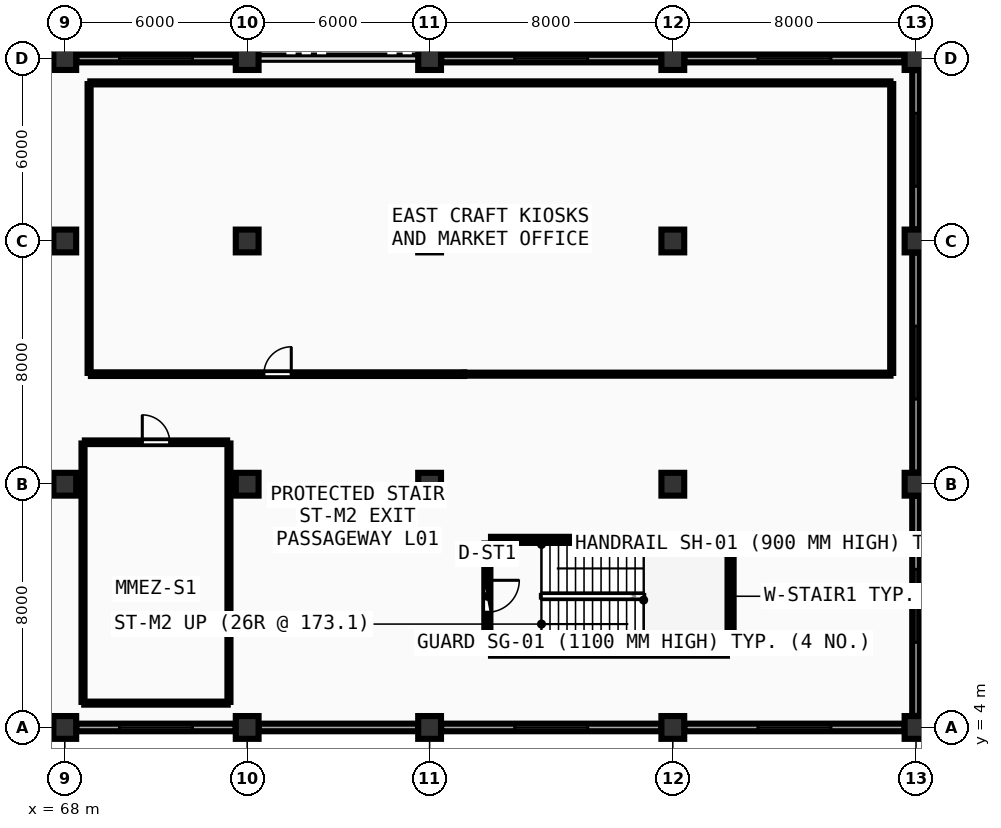
"""IFC4 building model, lengths in metres.
Left out: names, types, materials, properties, quantities, classifications, styles, units other than length and angle.
Written with IfcOpenShell. Run it as: python <this file> out.ifc"""

import sys

from ifc_helpers import new_model, si_unit, direction, frame, frame_2d, origin, origin_2d, place, context, subcontext, project, spatial, rectangle, extrude, element, fill, save


model = new_model("IFC4")
c1 = context("Model", 3, precision=1e-05, world=origin(), true_north=direction((0.0, 1.0)))
c2 = subcontext(c1, "Body", "Model", "MODEL_VIEW")
j1 = project(units=[si_unit("LENGTHUNIT", "METRE"), si_unit("PLANEANGLEUNIT", "RADIAN")], contexts=[c1])
p1 = place(None, origin())
s1 = spatial("IfcSite", under=j1, at=p1, CompositionType="ELEMENT")
p2 = place(p1, origin())
s2 = spatial("IfcBuilding", under=s1, at=p2, CompositionType="ELEMENT")
p3 = place(p2, frame((0.0, 0.0, 4.5)))
s3 = spatial("IfcBuildingStorey", under=s2, at=p3, CompositionType="ELEMENT", Elevation=4.5)
for number, where, z_axis, x_axis in (
    (1, (68.0, 4.0, 0.0), (0.0, 0.0, 1.0), (1.0, 0.0, 0.0)),
    (2, (68.0, 12.0, 0.0), (0.0, 0.0, 1.0), (1.0, 0.0, 0.0)),
    (3, (68.0, 20.0, 0.0), (0.0, 0.0, 1.0), (1.0, 0.0, 0.0)),
    (4, (68.0, 26.0, 0.0), (0.0, 0.0, 1.0), (1.0, 0.0, 0.0)),
    (5, (74.0, 4.0, 0.0), (0.0, 0.0, 1.0), (1.0, 0.0, 0.0)),
    (6, (74.0, 12.0, 0.0), (0.0, 0.0, 1.0), (1.0, 0.0, 0.0)),
    (7, (74.0, 20.0, 0.0), (0.0, 0.0, 1.0), (1.0, 0.0, 0.0)),
    (8, (74.0, 26.0, 0.0), (0.0, 0.0, 1.0), (1.0, 0.0, 0.0)),
    (9, (80.0, 4.0, 0.0), (0.0, 0.0, 1.0), (1.0, 0.0, 0.0)),
    (10, (80.0, 12.0, 0.0), (0.0, 0.0, 1.0), (1.0, 0.0, 0.0)),
    (11, (80.0, 20.0, 0.0), (0.0, 0.0, 1.0), (1.0, 0.0, 0.0)),
    (12, (80.0, 26.0, 0.0), (0.0, 0.0, 1.0), (1.0, 0.0, 0.0)),
    (13, (88.0, 4.0, 0.0), (0.0, 0.0, 1.0), (1.0, 0.0, 0.0)),
    (14, (88.0, 12.0, 0.0), (0.0, 0.0, 1.0), (1.0, 0.0, 0.0)),
    (15, (88.0, 20.0, 0.0), (0.0, 0.0, 1.0), (1.0, 0.0, 0.0)),
    (16, (88.0, 26.0, 0.0), (0.0, 0.0, 1.0), (1.0, 0.0, 0.0)),
    (17, (96.0, 4.0, 0.0), (0.0, 0.0, 1.0), (1.0, 0.0, 0.0)),
    (18, (96.0, 12.0, 0.0), (0.0, 0.0, 1.0), (1.0, 0.0, 0.0)),
    (19, (96.0, 20.0, 0.0), (0.0, 0.0, 1.0), (1.0, 0.0, 0.0)),
    (20, (96.0, 26.0, 0.0), (0.0, 0.0, 1.0), (1.0, 0.0, 0.0)),
):
    element("IfcColumn", number, at=place(p3, frame(where, z_axis=z_axis, x_axis=x_axis)), inside=s3, PredefinedType="COLUMN", context=c2, shape_type="SweptSolid", body=[
        extrude(rectangle(XDim=0.75, YDim=0.75, at=origin_2d()), origin(), (0.0, 0.0, 1.0), 4.5),
    ])
p4 = place(p3, frame((68.38, 4.0, 0.0), z_axis=(0.0, 0.0, 1.0), x_axis=(1.0, 0.0, 0.0)))
e21 = element("IfcWall", 21, at=p4, inside=s3, PredefinedType="SOLIDWALL", context=c2, shape_type="SweptSolid", body=[
    extrude(rectangle(XDim=5.24, YDim=0.25, at=frame_2d((2.62, 0.0))), origin(), (0.0, 0.0, 1.0), 3.42),
])
p5 = place(p4, frame((1.42, 0.0, 0.95)))
e22 = element("IfcOpeningElement", 22, at=p5, cuts=e21, PredefinedType="OPENING", context=c2, shape_type="SweptSolid", body=[
    extrude(rectangle(XDim=2.4, YDim=1.65, at=frame_2d((1.2, 0.825))), frame((0.0, 0.135, 0.0), z_axis=(0.0, -1.0, 0.0), x_axis=(1.0, 0.0, 0.0)), (0.0, 0.0, 1.0), 0.27),
])
p6 = place(p3, frame((74.38, 4.0, 0.0), z_axis=(0.0, 0.0, 1.0), x_axis=(1.0, 0.0, 0.0)))
e23 = element("IfcWall", 23, at=p6, inside=s3, PredefinedType="SOLIDWALL", context=c2, shape_type="SweptSolid", body=[
    extrude(rectangle(XDim=5.24, YDim=0.25, at=frame_2d((2.62, 0.0))), origin(), (0.0, 0.0, 1.0), 3.42),
])
p7 = place(p3, frame((80.38, 4.0, 0.0), z_axis=(0.0, 0.0, 1.0), x_axis=(1.0, 0.0, 0.0)))
e24 = element("IfcWall", 24, at=p7, inside=s3, PredefinedType="SOLIDWALL", context=c2, shape_type="SweptSolid", body=[
    extrude(rectangle(XDim=7.24, YDim=0.25, at=frame_2d((3.62, 0.0))), origin(), (0.0, 0.0, 1.0), 3.42),
])
p8 = place(p7, frame((2.42, 0.0, 0.95)))
e25 = element("IfcOpeningElement", 25, at=p8, cuts=e24, PredefinedType="OPENING", context=c2, shape_type="SweptSolid", body=[
    extrude(rectangle(XDim=2.4, YDim=1.65, at=frame_2d((1.2, 0.825))), frame((0.0, 0.135, 0.0), z_axis=(0.0, -1.0, 0.0), x_axis=(1.0, 0.0, 0.0)), (0.0, 0.0, 1.0), 0.27),
])
p9 = place(p3, frame((88.38, 4.0, 0.0), z_axis=(0.0, 0.0, 1.0), x_axis=(1.0, 0.0, 0.0)))
e26 = element("IfcWall", 26, at=p9, inside=s3, PredefinedType="SOLIDWALL", context=c2, shape_type="SweptSolid", body=[
    extrude(rectangle(XDim=7.24, YDim=0.25, at=frame_2d((3.62, 0.0))), origin(), (0.0, 0.0, 1.0), 3.42),
])
p10 = place(p9, frame((2.42, 0.0, 0.95)))
e27 = element("IfcOpeningElement", 27, at=p10, cuts=e26, PredefinedType="OPENING", context=c2, shape_type="SweptSolid", body=[
    extrude(rectangle(XDim=2.4, YDim=1.65, at=frame_2d((1.2, 0.825))), frame((0.0, 0.135, 0.0), z_axis=(0.0, -1.0, 0.0), x_axis=(1.0, 0.0, 0.0)), (0.0, 0.0, 1.0), 0.27),
])
p11 = place(p3, frame((96.0, 4.38, 0.0), z_axis=(0.0, 0.0, 1.0), x_axis=(0.0, 1.0, 0.0)))
e28 = element("IfcWall", 28, at=p11, inside=s3, PredefinedType="SOLIDWALL", context=c2, shape_type="SweptSolid", body=[
    extrude(rectangle(XDim=7.24, YDim=0.25, at=frame_2d((3.62, 0.0))), origin(), (0.0, 0.0, 1.0), 3.42),
])
p12 = place(p11, frame((2.42, 0.0, 0.95)))
e29 = element("IfcOpeningElement", 29, at=p12, cuts=e28, PredefinedType="OPENING", context=c2, shape_type="SweptSolid", body=[
    extrude(rectangle(XDim=2.4, YDim=1.65, at=frame_2d((1.2, 0.825))), frame((0.0, 0.135, 0.0), z_axis=(0.0, -1.0, 0.0), x_axis=(1.0, 0.0, 0.0)), (0.0, 0.0, 1.0), 0.27),
])
p13 = place(p3, frame((96.0, 12.38, 0.0), z_axis=(0.0, 0.0, 1.0), x_axis=(0.0, 1.0, 0.0)))
e30 = element("IfcWall", 30, at=p13, inside=s3, PredefinedType="SOLIDWALL", context=c2, shape_type="SweptSolid", body=[
    extrude(rectangle(XDim=7.24, YDim=0.25, at=frame_2d((3.62, 0.0))), origin(), (0.0, 0.0, 1.0), 3.42),
])
p14 = place(p13, frame((2.42, 0.0, 0.95)))
e31 = element("IfcOpeningElement", 31, at=p14, cuts=e30, PredefinedType="OPENING", context=c2, shape_type="SweptSolid", body=[
    extrude(rectangle(XDim=2.4, YDim=1.65, at=frame_2d((1.2, 0.825))), frame((0.0, 0.135, 0.0), z_axis=(0.0, -1.0, 0.0), x_axis=(1.0, 0.0, 0.0)), (0.0, 0.0, 1.0), 0.27),
])
p15 = place(p3, frame((96.0, 20.38, 0.0), z_axis=(0.0, 0.0, 1.0), x_axis=(0.0, 1.0, 0.0)))
e32 = element("IfcWall", 32, at=p15, inside=s3, PredefinedType="SOLIDWALL", context=c2, shape_type="SweptSolid", body=[
    extrude(rectangle(XDim=5.24, YDim=0.25, at=frame_2d((2.62, 0.0))), origin(), (0.0, 0.0, 1.0), 3.42),
])
p16 = place(p15, frame((1.42, 0.0, 0.95)))
e33 = element("IfcOpeningElement", 33, at=p16, cuts=e32, PredefinedType="OPENING", context=c2, shape_type="SweptSolid", body=[
    extrude(rectangle(XDim=2.4, YDim=1.65, at=frame_2d((1.2, 0.825))), frame((0.0, 0.135, 0.0), z_axis=(0.0, -1.0, 0.0), x_axis=(1.0, 0.0, 0.0)), (0.0, 0.0, 1.0), 0.27),
])
p17 = place(p3, frame((95.62, 26.0, 0.0), z_axis=(0.0, 0.0, 1.0), x_axis=(-1.0, 0.0, 0.0)))
e34 = element("IfcWall", 34, at=p17, inside=s3, PredefinedType="SOLIDWALL", context=c2, shape_type="SweptSolid", body=[
    extrude(rectangle(XDim=7.24, YDim=0.25, at=frame_2d((3.62, 0.0))), origin(), (0.0, 0.0, 1.0), 3.42),
])
p18 = place(p17, frame((2.42, 0.0, 0.95)))
e35 = element("IfcOpeningElement", 35, at=p18, cuts=e34, PredefinedType="OPENING", context=c2, shape_type="SweptSolid", body=[
    extrude(rectangle(XDim=2.4, YDim=1.65, at=frame_2d((1.2, 0.825))), frame((0.0, 0.135, 0.0), z_axis=(0.0, -1.0, 0.0), x_axis=(1.0, 0.0, 0.0)), (0.0, 0.0, 1.0), 0.27),
])
p19 = place(p3, frame((87.62, 26.0, 0.0), z_axis=(0.0, 0.0, 1.0), x_axis=(-1.0, 0.0, 0.0)))
e36 = element("IfcWall", 36, at=p19, inside=s3, PredefinedType="SOLIDWALL", context=c2, shape_type="SweptSolid", body=[
    extrude(rectangle(XDim=7.24, YDim=0.25, at=frame_2d((3.62, 0.0))), origin(), (0.0, 0.0, 1.0), 3.42),
])
p20 = place(p19, frame((2.42, 0.0, 0.95)))
e37 = element("IfcOpeningElement", 37, at=p20, cuts=e36, PredefinedType="OPENING", context=c2, shape_type="SweptSolid", body=[
    extrude(rectangle(XDim=2.4, YDim=1.65, at=frame_2d((1.2, 0.825))), frame((0.0, 0.135, 0.0), z_axis=(0.0, -1.0, 0.0), x_axis=(1.0, 0.0, 0.0)), (0.0, 0.0, 1.0), 0.27),
])
p21 = place(p3, frame((73.62, 26.0, 0.0), z_axis=(0.0, 0.0, 1.0), x_axis=(-1.0, 0.0, 0.0)))
e38 = element("IfcWall", 38, at=p21, inside=s3, PredefinedType="SOLIDWALL", context=c2, shape_type="SweptSolid", body=[
    extrude(rectangle(XDim=5.24, YDim=0.25, at=frame_2d((2.62, 0.0))), origin(), (0.0, 0.0, 1.0), 3.42),
])
p22 = place(p21, frame((1.42, 0.0, 0.95)))
e39 = element("IfcOpeningElement", 39, at=p22, cuts=e38, PredefinedType="OPENING", context=c2, shape_type="SweptSolid", body=[
    extrude(rectangle(XDim=2.4, YDim=1.65, at=frame_2d((1.2, 0.825))), frame((0.0, 0.135, 0.0), z_axis=(0.0, -1.0, 0.0), x_axis=(1.0, 0.0, 0.0)), (0.0, 0.0, 1.0), 0.27),
])
p23 = place(p3, frame((67.62, 26.0, 0.0), z_axis=(0.0, 0.0, 1.0), x_axis=(-1.0, 0.0, 0.0)))
e40 = element("IfcWall", 40, at=p23, inside=s3, PredefinedType="SOLIDWALL", context=c2, shape_type="SweptSolid", body=[
    extrude(rectangle(XDim=7.24, YDim=0.25, at=frame_2d((3.62, 0.0))), origin(), (0.0, 0.0, 1.0), 3.42),
])
p24 = place(p23, frame((2.42, 0.0, 0.95)))
e41 = element("IfcOpeningElement", 41, at=p24, cuts=e40, PredefinedType="OPENING", context=c2, shape_type="SweptSolid", body=[
    extrude(rectangle(XDim=2.4, YDim=1.65, at=frame_2d((1.2, 0.825))), frame((0.0, 0.135, 0.0), z_axis=(0.0, -1.0, 0.0), x_axis=(1.0, 0.0, 0.0)), (0.0, 0.0, 1.0), 0.27),
])
p25 = place(p3, frame((82.02, 6.46, 0.0), z_axis=(0.0, 0.0, 1.0), x_axis=(1.0, 0.0, 0.0)))
e42 = element("IfcWall", 42, at=p25, inside=s3, PredefinedType="SHEAR", context=c2, shape_type="SweptSolid", body=[
    extrude(rectangle(XDim=7.76, YDim=0.2, at=frame_2d((3.88, 0.0))), origin(), (0.0, 0.0, 1.0), 4.24),
])
p26 = place(p3, frame((89.9, 6.58, 0.0), z_axis=(0.0, 0.0, 1.0), x_axis=(0.0, 1.0, 0.0)))
e43 = element("IfcWall", 43, at=p26, inside=s3, PredefinedType="SHEAR", context=c2, shape_type="SweptSolid", body=[
    extrude(rectangle(XDim=3.47, YDim=0.2, at=frame_2d((1.735, 0.0))), origin(), (0.0, 0.0, 1.0), 4.24),
])
p27 = place(p3, frame((89.78, 10.17, 0.0), z_axis=(0.0, 0.0, 1.0), x_axis=(-1.0, 0.0, 0.0)))
e44 = element("IfcWall", 44, at=p27, inside=s3, PredefinedType="SHEAR", context=c2, shape_type="SweptSolid", body=[
    extrude(rectangle(XDim=7.76, YDim=0.2, at=frame_2d((3.88, 0.0))), origin(), (0.0, 0.0, 1.0), 4.24),
])
p28 = place(p3, frame((81.9, 10.05, 0.0), z_axis=(0.0, 0.0, 1.0), x_axis=(0.0, -1.0, 0.0)))
e45 = element("IfcWall", 45, at=p28, inside=s3, PredefinedType="SHEAR", context=c2, shape_type="SweptSolid", body=[
    extrude(rectangle(XDim=3.47, YDim=0.2, at=frame_2d((1.735, 0.0))), origin(), (0.0, 0.0, 1.0), 4.24),
])
p29 = place(p28, frame((1.21, 0.0, 0.0)))
e46 = element("IfcOpeningElement", 46, at=p29, cuts=e45, PredefinedType="OPENING", context=c2, shape_type="SweptSolid", body=[
    extrude(rectangle(XDim=1.05, YDim=2.1, at=frame_2d((0.525, 1.05))), frame((0.0, 0.11, 0.0), z_axis=(0.0, -1.0, 0.0), x_axis=(1.0, 0.0, 0.0)), (0.0, 0.0, 1.0), 0.22),
])
p30 = place(p3, frame((68.66, 13.38, 0.0), z_axis=(0.0, 0.0, 1.0), x_axis=(1.0, 0.0, 0.0)))
e47 = element("IfcWall", 47, at=p30, inside=s3, PredefinedType="PARTITIONING", context=c2, shape_type="SweptSolid", body=[
    extrude(rectangle(XDim=4.68, YDim=0.12, at=frame_2d((2.34, 0.0))), origin(), (0.0, 0.0, 1.0), 4.19),
])
p31 = place(p30, frame((1.89, 0.0, 0.0)))
e48 = element("IfcOpeningElement", 48, at=p31, cuts=e47, PredefinedType="OPENING", context=c2, shape_type="SweptSolid", body=[
    extrude(rectangle(XDim=0.9, YDim=2.08, at=frame_2d((0.45, 1.04))), frame((0.0, 0.07, 0.0), z_axis=(0.0, -1.0, 0.0), x_axis=(1.0, 0.0, 0.0)), (0.0, 0.0, 1.0), 0.14),
])
p32 = place(p3, frame((68.86, 15.62, 0.0), z_axis=(0.0, 0.0, 1.0), x_axis=(1.0, 0.0, 0.0)))
e49 = element("IfcWall", 49, at=p32, inside=s3, PredefinedType="PARTITIONING", context=c2, shape_type="SweptSolid", body=[
    extrude(rectangle(XDim=12.28, YDim=0.12, at=frame_2d((6.14, 0.0))), origin(), (0.0, 0.0, 1.0), 3.425),
])
p33 = place(p32, frame((5.69, 0.0, 0.0)))
e50 = element("IfcOpeningElement", 50, at=p33, cuts=e49, PredefinedType="OPENING", context=c2, shape_type="SweptSolid", body=[
    extrude(rectangle(XDim=0.9, YDim=2.08, at=frame_2d((0.45, 1.04))), frame((0.0, 0.07, 0.0), z_axis=(0.0, -1.0, 0.0), x_axis=(1.0, 0.0, 0.0)), (0.0, 0.0, 1.0), 0.14),
])
p34 = place(p3, frame((68.64, 4.8, 0.0), z_axis=(0.0, 0.0, 1.0), x_axis=(1.0, 0.0, 0.0)))
e51 = element("IfcWall", 51, at=p34, inside=s3, PredefinedType="PARTITIONING", context=c2, shape_type="SweptSolid", body=[
    extrude(rectangle(XDim=4.72, YDim=0.1, at=frame_2d((2.36, 0.0))), origin(), (0.0, 0.0, 1.0), 4.19),
])
for number, where, z_axis, x_axis in (
    (52, (73.4, 4.84, 0.0), (0.0, 0.0, 1.0), (0.0, 1.0, 0.0)),
    (53, (68.6, 13.34, 0.0), (0.0, 0.0, 1.0), (0.0, -1.0, 0.0)),
):
    element("IfcWall", number, at=place(p3, frame(where, z_axis=z_axis, x_axis=x_axis)), inside=s3, PredefinedType="PARTITIONING", context=c2, shape_type="SweptSolid", body=[
        extrude(rectangle(XDim=8.5, YDim=0.1, at=frame_2d((4.25, 0.0))), origin(), (0.0, 0.0, 1.0), 3.425),
    ])
p35 = place(p3, frame((81.14, 15.62, 0.0), z_axis=(0.0, 0.0, 1.0), x_axis=(1.0, 0.0, 0.0)))
e54 = element("IfcWall", 54, at=p35, inside=s3, PredefinedType="PARTITIONING", context=c2, shape_type="SweptSolid", body=[
    extrude(rectangle(XDim=14.02, YDim=0.1, at=frame_2d((7.01, 0.0))), origin(), (0.0, 0.0, 1.0), 3.425),
])
p36 = place(p3, frame((95.2, 15.66, 0.0), z_axis=(0.0, 0.0, 1.0), x_axis=(0.0, 1.0, 0.0)))
e55 = element("IfcWall", 55, at=p36, inside=s3, PredefinedType="PARTITIONING", context=c2, shape_type="SweptSolid", body=[
    extrude(rectangle(XDim=9.5, YDim=0.1, at=frame_2d((4.75, 0.0))), origin(), (0.0, 0.0, 1.0), 3.425),
])
p37 = place(p3, frame((95.16, 25.2, 0.0), z_axis=(0.0, 0.0, 1.0), x_axis=(-1.0, 0.0, 0.0)))
e56 = element("IfcWall", 56, at=p37, inside=s3, PredefinedType="PARTITIONING", context=c2, shape_type="SweptSolid", body=[
    extrude(rectangle(XDim=26.32, YDim=0.1, at=frame_2d((13.16, 0.0))), origin(), (0.0, 0.0, 1.0), 3.425),
])
p38 = place(p3, frame((68.8, 25.16, 0.0), z_axis=(0.0, 0.0, 1.0), x_axis=(0.0, -1.0, 0.0)))
e57 = element("IfcWall", 57, at=p38, inside=s3, PredefinedType="PARTITIONING", context=c2, shape_type="SweptSolid", body=[
    extrude(rectangle(XDim=9.5, YDim=0.1, at=frame_2d((4.75, 0.0))), origin(), (0.0, 0.0, 1.0), 3.425),
])
p39 = place(p5, origin())
e58 = element("IfcWindow", 58, at=p39, inside=s3, PartitioningType="SINGLE_PANEL", PredefinedType="WINDOW", context=c2, shape_type="SweptSolid", body=[
    extrude(rectangle(XDim=2.4, YDim=1.65, at=frame_2d((1.2, 0.825))), frame((0.0, 0.03, 0.0), z_axis=(0.0, -1.0, 0.0), x_axis=(1.0, 0.0, 0.0)), (0.0, 0.0, 1.0), 0.06),
])
fill(e22, e58)
p40 = place(p8, origin())
e59 = element("IfcWindow", 59, at=p40, inside=s3, PartitioningType="SINGLE_PANEL", PredefinedType="WINDOW", context=c2, shape_type="SweptSolid", body=[
    extrude(rectangle(XDim=2.4, YDim=1.65, at=frame_2d((1.2, 0.825))), frame((0.0, 0.03, 0.0), z_axis=(0.0, -1.0, 0.0), x_axis=(1.0, 0.0, 0.0)), (0.0, 0.0, 1.0), 0.06),
])
fill(e25, e59)
p41 = place(p10, origin())
e60 = element("IfcWindow", 60, at=p41, inside=s3, PartitioningType="SINGLE_PANEL", PredefinedType="WINDOW", context=c2, shape_type="SweptSolid", body=[
    extrude(rectangle(XDim=2.4, YDim=1.65, at=frame_2d((1.2, 0.825))), frame((0.0, 0.03, 0.0), z_axis=(0.0, -1.0, 0.0), x_axis=(1.0, 0.0, 0.0)), (0.0, 0.0, 1.0), 0.06),
])
fill(e27, e60)
p42 = place(p12, origin())
e61 = element("IfcWindow", 61, at=p42, inside=s3, PartitioningType="SINGLE_PANEL", PredefinedType="WINDOW", context=c2, shape_type="SweptSolid", body=[
    extrude(rectangle(XDim=2.4, YDim=1.65, at=frame_2d((1.2, 0.825))), frame((0.0, 0.03, 0.0), z_axis=(0.0, -1.0, 0.0), x_axis=(1.0, 0.0, 0.0)), (0.0, 0.0, 1.0), 0.06),
])
fill(e29, e61)
p43 = place(p14, origin())
e62 = element("IfcWindow", 62, at=p43, inside=s3, PartitioningType="SINGLE_PANEL", PredefinedType="WINDOW", context=c2, shape_type="SweptSolid", body=[
    extrude(rectangle(XDim=2.4, YDim=1.65, at=frame_2d((1.2, 0.825))), frame((0.0, 0.03, 0.0), z_axis=(0.0, -1.0, 0.0), x_axis=(1.0, 0.0, 0.0)), (0.0, 0.0, 1.0), 0.06),
])
fill(e31, e62)
p44 = place(p16, origin())
e63 = element("IfcWindow", 63, at=p44, inside=s3, PartitioningType="SINGLE_PANEL", PredefinedType="WINDOW", context=c2, shape_type="SweptSolid", body=[
    extrude(rectangle(XDim=2.4, YDim=1.65, at=frame_2d((1.2, 0.825))), frame((0.0, 0.03, 0.0), z_axis=(0.0, -1.0, 0.0), x_axis=(1.0, 0.0, 0.0)), (0.0, 0.0, 1.0), 0.06),
])
fill(e33, e63)
p45 = place(p18, origin())
e64 = element("IfcWindow", 64, at=p45, inside=s3, PartitioningType="SINGLE_PANEL", PredefinedType="WINDOW", context=c2, shape_type="SweptSolid", body=[
    extrude(rectangle(XDim=2.4, YDim=1.65, at=frame_2d((1.2, 0.825))), frame((0.0, 0.03, 0.0), z_axis=(0.0, -1.0, 0.0), x_axis=(1.0, 0.0, 0.0)), (0.0, 0.0, 1.0), 0.06),
])
fill(e35, e64)
p46 = place(p20, origin())
e65 = element("IfcWindow", 65, at=p46, inside=s3, PartitioningType="SINGLE_PANEL", PredefinedType="WINDOW", context=c2, shape_type="SweptSolid", body=[
    extrude(rectangle(XDim=2.4, YDim=1.65, at=frame_2d((1.2, 0.825))), frame((0.0, 0.03, 0.0), z_axis=(0.0, -1.0, 0.0), x_axis=(1.0, 0.0, 0.0)), (0.0, 0.0, 1.0), 0.06),
])
fill(e37, e65)
p47 = place(p22, origin())
e66 = element("IfcWindow", 66, at=p47, inside=s3, PartitioningType="SINGLE_PANEL", PredefinedType="WINDOW", context=c2, shape_type="SweptSolid", body=[
    extrude(rectangle(XDim=2.4, YDim=1.65, at=frame_2d((1.2, 0.825))), frame((0.0, 0.03, 0.0), z_axis=(0.0, -1.0, 0.0), x_axis=(1.0, 0.0, 0.0)), (0.0, 0.0, 1.0), 0.06),
])
fill(e39, e66)
p48 = place(p29, origin())
e67 = element("IfcDoor", 67, at=p48, inside=s3, OperationType="SINGLE_SWING_LEFT", PredefinedType="DOOR", context=c2, shape_type="SweptSolid", body=[
    extrude(rectangle(XDim=1.05, YDim=2.1, at=frame_2d((0.525, 1.05))), frame((0.0, 0.025, 0.0), z_axis=(0.0, -1.0, 0.0), x_axis=(1.0, 0.0, 0.0)), (0.0, 0.0, 1.0), 0.05),
])
fill(e46, e67)
p49 = place(p31, origin())
e68 = element("IfcDoor", 68, at=p49, inside=s3, OperationType="SINGLE_SWING_LEFT", PredefinedType="DOOR", context=c2, shape_type="SweptSolid", body=[
    extrude(rectangle(XDim=0.9, YDim=2.08, at=frame_2d((0.45, 1.04))), frame((0.0, 0.025, 0.0), z_axis=(0.0, -1.0, 0.0), x_axis=(1.0, 0.0, 0.0)), (0.0, 0.0, 1.0), 0.05),
])
fill(e48, e68)
p50 = place(p33, origin())
e69 = element("IfcDoor", 69, at=p50, inside=s3, OperationType="SINGLE_SWING_RIGHT", PredefinedType="DOOR", context=c2, shape_type="SweptSolid", body=[
    extrude(rectangle(XDim=0.9, YDim=2.08, at=frame_2d((0.45, 1.04))), frame((0.0, 0.025, 0.0), z_axis=(0.0, -1.0, 0.0), x_axis=(1.0, 0.0, 0.0)), (0.0, 0.0, 1.0), 0.05),
])
fill(e50, e69)
save(model, sys.argv[1])
